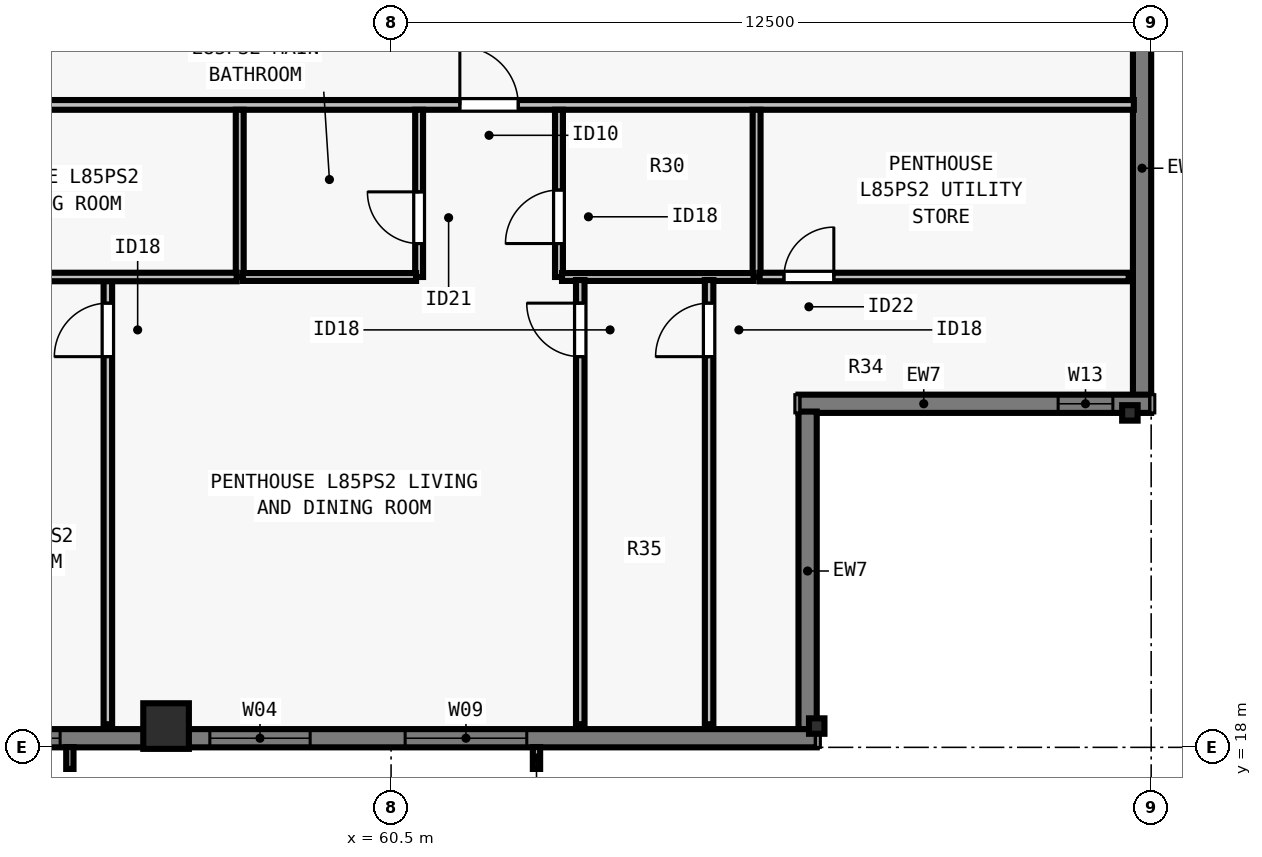
"""IFC4 building model, lengths in metres.
Left out: names, types, materials, properties, quantities, classifications, styles, units other than length and angle.
Written with IfcOpenShell. Run it as: python <this file> out.ifc"""

import sys

from ifc_helpers import new_model, si_unit, direction, frame, frame_2d, origin, origin_2d, place, context, subcontext, project, spatial, rectangle, i_section, extrude, element, fill, save


model = new_model("IFC4")
c1 = context("Model", 3, precision=1e-05, world=origin(), true_north=direction((0.0, 1.0)))
c2 = subcontext(c1, "Body", "Model", "MODEL_VIEW")
j1 = project(units=[si_unit("LENGTHUNIT", "METRE"), si_unit("PLANEANGLEUNIT", "RADIAN")], contexts=[c1])
p1 = place(None, origin())
s1 = spatial("IfcSite", under=j1, at=p1, CompositionType="ELEMENT")
p2 = place(p1, origin())
s2 = spatial("IfcBuilding", under=s1, at=p2, CompositionType="ELEMENT")
p3 = place(p2, frame((0.0, 0.0, 308.5)))
s3 = spatial("IfcBuildingStorey", under=s2, at=p3, CompositionType="ELEMENT", Elevation=308.5)
p4 = place(p3, frame((56.8, 18.35, 0.0), z_axis=(0.0, 0.0, 1.0), x_axis=(1.0, 0.0, 0.0)))
e1 = element("IfcColumn", 1, at=p4, inside=s3, PredefinedType="COLUMN", context=c2, shape_type="SweptSolid", body=[
    extrude(rectangle(XDim=0.75, YDim=0.75, at=origin_2d()), origin(), (0.0, 0.0, 1.0), 3.5),
])
for number, where, z_axis, x_axis in (
    (2, (67.5, 18.35, 0.0), (0.0, 0.0, 1.0), (1.0, 0.0, 0.0)),
    (3, (72.65, 23.5, 0.0), (0.0, 0.0, 1.0), (0.0, 1.0, 0.0)),
):
    element("IfcColumn", number, at=place(p3, frame(where, z_axis=z_axis, x_axis=x_axis)), inside=s3, PredefinedType="COLUMN", context=c2, shape_type="SweptSolid", body=[
        extrude(i_section(OverallWidth=0.254, OverallDepth=0.254, WebThickness=0.009, FlangeThickness=0.014, FilletRadius=0.013, at=origin_2d()), origin(), (0.0, 0.0, 1.0), 3.5),
    ])
p5 = place(p3, frame((72.85, 36.4, 0.0), z_axis=(0.0, 0.0, 1.0), x_axis=(0.0, -1.0, 0.0)))
e4 = element("IfcWall", 4, at=p5, inside=s3, PredefinedType="SOLIDWALL", context=c2, shape_type="SweptSolid", body=[
    extrude(rectangle(XDim=12.622, YDim=0.3, at=frame_2d((6.311, 0.0))), origin(), (0.0, 0.0, 1.0), 3.29),
])
p6 = place(p5, frame((2.98, 0.0, 0.8)))
e5 = element("IfcOpeningElement", 5, at=p6, cuts=e4, PredefinedType="OPENING", context=c2, shape_type="SweptSolid", body=[
    extrude(rectangle(XDim=2.0, YDim=1.758, at=frame_2d((1.0, 0.879))), frame((0.0, 0.16, 0.0), z_axis=(0.0, -1.0, 0.0), x_axis=(1.0, 0.0, 0.0)), (0.0, 0.0, 1.0), 0.32),
])
p7 = place(p3, frame((73.0, 23.65, 0.0), z_axis=(0.0, 0.0, 1.0), x_axis=(-1.0, 0.0, 0.0)))
e6 = element("IfcWall", 6, at=p7, inside=s3, PredefinedType="SOLIDWALL", context=c2, shape_type="SweptSolid", body=[
    extrude(rectangle(XDim=5.8, YDim=0.3, at=frame_2d((2.9, 0.0))), origin(), (0.0, 0.0, 1.0), 3.29),
])
p8 = place(p7, frame((0.63, 0.0, 0.8)))
e7 = element("IfcOpeningElement", 7, at=p8, cuts=e6, PredefinedType="OPENING", context=c2, shape_type="SweptSolid", body=[
    extrude(rectangle(XDim=0.9, YDim=1.75, at=frame_2d((0.45, 0.875))), frame((0.0, 0.16, 0.0), z_axis=(0.0, -1.0, 0.0), x_axis=(1.0, 0.0, 0.0)), (0.0, 0.0, 1.0), 0.32),
])
p9 = place(p3, frame((67.35, 23.522, 0.0), z_axis=(0.0, 0.0, 1.0), x_axis=(0.0, -1.0, 0.0)))
e8 = element("IfcWall", 8, at=p9, inside=s3, PredefinedType="SOLIDWALL", context=c2, shape_type="SweptSolid", body=[
    extrude(rectangle(XDim=5.244, YDim=0.3, at=frame_2d((2.622, 0.0))), origin(), (0.0, 0.0, 1.0), 3.29),
])
p10 = place(p3, frame((67.5, 18.15, 0.0), z_axis=(0.0, 0.0, 1.0), x_axis=(-1.0, 0.0, 0.0)))
e9 = element("IfcWall", 9, at=p10, inside=s3, PredefinedType="SOLIDWALL", context=c2, shape_type="SweptSolid", body=[
    extrude(rectangle(XDim=30.722, YDim=0.3, at=frame_2d((15.361, 0.0))), origin(), (0.0, 0.0, 1.0), 3.29),
])
p11 = place(p10, frame((4.769, 0.0, 0.8)))
e10 = element("IfcOpeningElement", 10, at=p11, cuts=e9, PredefinedType="OPENING", context=c2, shape_type="SweptSolid", body=[
    extrude(rectangle(XDim=2.0, YDim=1.758, at=frame_2d((1.0, 0.879))), frame((0.0, 0.16, 0.0), z_axis=(0.0, -1.0, 0.0), x_axis=(1.0, 0.0, 0.0)), (0.0, 0.0, 1.0), 0.32),
])
p12 = place(p10, frame((8.331, 0.0, 0.8)))
e11 = element("IfcOpeningElement", 11, at=p12, cuts=e9, PredefinedType="OPENING", context=c2, shape_type="SweptSolid", body=[
    extrude(rectangle(XDim=1.65, YDim=1.758, at=frame_2d((0.825, 0.879))), frame((0.0, 0.16, 0.0), z_axis=(0.0, -1.0, 0.0), x_axis=(1.0, 0.0, 0.0)), (0.0, 0.0, 1.0), 0.32),
])
p13 = place(p10, frame((12.442, 0.0, 0.8)))
e12 = element("IfcOpeningElement", 12, at=p13, cuts=e9, PredefinedType="OPENING", context=c2, shape_type="SweptSolid", body=[
    extrude(rectangle(XDim=2.0, YDim=1.758, at=frame_2d((1.0, 0.879))), frame((0.0, 0.16, 0.0), z_axis=(0.0, -1.0, 0.0), x_axis=(1.0, 0.0, 0.0)), (0.0, 0.0, 1.0), 0.32),
])
p14 = place(p10, frame((16.455, 0.0, 0.8)))
e13 = element("IfcOpeningElement", 13, at=p14, cuts=e9, PredefinedType="OPENING", context=c2, shape_type="SweptSolid", body=[
    extrude(rectangle(XDim=1.65, YDim=1.758, at=frame_2d((0.825, 0.879))), frame((0.0, 0.16, 0.0), z_axis=(0.0, -1.0, 0.0), x_axis=(1.0, 0.0, 0.0)), (0.0, 0.0, 1.0), 0.32),
])
p15 = place(p10, frame((20.967, 0.0, 0.8)))
e14 = element("IfcOpeningElement", 14, at=p15, cuts=e9, PredefinedType="OPENING", context=c2, shape_type="SweptSolid", body=[
    extrude(rectangle(XDim=2.0, YDim=1.758, at=frame_2d((1.0, 0.879))), frame((0.0, 0.16, 0.0), z_axis=(0.0, -1.0, 0.0), x_axis=(1.0, 0.0, 0.0)), (0.0, 0.0, 1.0), 0.32),
])
p16 = place(p10, frame((24.128, 0.0, 0.8)))
e15 = element("IfcOpeningElement", 15, at=p16, cuts=e9, PredefinedType="OPENING", context=c2, shape_type="SweptSolid", body=[
    extrude(rectangle(XDim=1.65, YDim=1.758, at=frame_2d((0.825, 0.879))), frame((0.0, 0.16, 0.0), z_axis=(0.0, -1.0, 0.0), x_axis=(1.0, 0.0, 0.0)), (0.0, 0.0, 1.0), 0.32),
])
p17 = place(p3, frame((31.285, 28.565, 0.0), z_axis=(0.0, 0.0, 1.0), x_axis=(1.0, 0.0, 0.0)))
e16 = element("IfcWall", 16, at=p17, inside=s3, PredefinedType="PARTITIONING", context=c2, shape_type="SweptSolid", body=[
    extrude(rectangle(XDim=41.43, YDim=0.16, at=frame_2d((20.715, 0.0))), origin(), (0.0, 0.0, 1.0), 3.009),
])
p18 = place(p17, frame((9.766, 0.0, 0.0)))
e17 = element("IfcOpeningElement", 17, at=p18, cuts=e16, PredefinedType="OPENING", context=c2, shape_type="SweptSolid", body=[
    extrude(rectangle(XDim=0.96, YDim=2.18, at=frame_2d((0.48, 1.09))), frame((0.0, 0.09, 0.0), z_axis=(0.0, -1.0, 0.0), x_axis=(1.0, 0.0, 0.0)), (0.0, 0.0, 1.0), 0.18),
])
p19 = place(p17, frame((30.346, 0.0, 0.0)))
e18 = element("IfcOpeningElement", 18, at=p19, cuts=e16, PredefinedType="OPENING", context=c2, shape_type="SweptSolid", body=[
    extrude(rectangle(XDim=0.96, YDim=2.18, at=frame_2d((0.48, 1.09))), frame((0.0, 0.09, 0.0), z_axis=(0.0, -1.0, 0.0), x_axis=(1.0, 0.0, 0.0)), (0.0, 0.0, 1.0), 0.18),
])
p20 = place(p3, frame((58.011, 25.735, 0.0), z_axis=(0.0, 0.0, 1.0), x_axis=(0.0, 1.0, 0.0)))
e19 = element("IfcWall", 19, at=p20, inside=s3, PredefinedType="PLUMBINGWALL", context=c2, shape_type="SweptSolid", body=[
    extrude(rectangle(XDim=2.75, YDim=0.13, at=frame_2d((1.375, 0.0))), origin(), (0.0, 0.0, 1.0), 3.29),
])
p21 = place(p3, frame((60.961, 25.735, 0.0), z_axis=(0.0, 0.0, 1.0), x_axis=(0.0, 1.0, 0.0)))
e20 = element("IfcWall", 20, at=p21, inside=s3, PredefinedType="PLUMBINGWALL", context=c2, shape_type="SweptSolid", body=[
    extrude(rectangle(XDim=2.75, YDim=0.13, at=frame_2d((1.375, 0.0))), origin(), (0.0, 0.0, 1.0), 3.29),
])
p22 = place(p21, frame((0.55, 0.0, 0.0)))
e21 = element("IfcOpeningElement", 21, at=p22, cuts=e20, PredefinedType="OPENING", context=c2, shape_type="SweptSolid", body=[
    extrude(rectangle(XDim=0.85, YDim=2.08, at=frame_2d((0.425, 1.04))), frame((0.0, 0.075, 0.0), z_axis=(0.0, -1.0, 0.0), x_axis=(1.0, 0.0, 0.0)), (0.0, 0.0, 1.0), 0.15),
])
p23 = place(p3, frame((58.061, 25.735, 0.0), z_axis=(0.0, 0.0, 1.0), x_axis=(1.0, 0.0, 0.0)))
e22 = element("IfcWall", 22, at=p23, inside=s3, PredefinedType="PLUMBINGWALL", context=c2, shape_type="SweptSolid", body=[
    extrude(rectangle(XDim=2.85, YDim=0.13, at=frame_2d((1.425, 0.0))), origin(), (0.0, 0.0, 1.0), 3.29),
])
p24 = place(p3, frame((66.511, 25.735, 0.0), z_axis=(0.0, 0.0, 1.0), x_axis=(0.0, 1.0, 0.0)))
e23 = element("IfcWall", 23, at=p24, inside=s3, PredefinedType="PLUMBINGWALL", context=c2, shape_type="SweptSolid", body=[
    extrude(rectangle(XDim=2.75, YDim=0.13, at=frame_2d((1.375, 0.0))), origin(), (0.0, 0.0, 1.0), 3.29),
])
p25 = place(p3, frame((63.261, 25.735, 0.0), z_axis=(0.0, 0.0, 1.0), x_axis=(0.0, 1.0, 0.0)))
e24 = element("IfcWall", 24, at=p25, inside=s3, PredefinedType="PLUMBINGWALL", context=c2, shape_type="SweptSolid", body=[
    extrude(rectangle(XDim=2.75, YDim=0.13, at=frame_2d((1.375, 0.0))), origin(), (0.0, 0.0, 1.0), 3.29),
])
p26 = place(p25, frame((0.55, 0.0, 0.0)))
e25 = element("IfcOpeningElement", 25, at=p26, cuts=e24, PredefinedType="OPENING", context=c2, shape_type="SweptSolid", body=[
    extrude(rectangle(XDim=0.88, YDim=2.1, at=frame_2d((0.44, 1.05))), frame((0.0, 0.075, 0.0), z_axis=(0.0, -1.0, 0.0), x_axis=(1.0, 0.0, 0.0)), (0.0, 0.0, 1.0), 0.15),
])
p27 = place(p3, frame((63.311, 25.735, 0.0), z_axis=(0.0, 0.0, 1.0), x_axis=(1.0, 0.0, 0.0)))
e26 = element("IfcWall", 26, at=p27, inside=s3, PredefinedType="PLUMBINGWALL", context=c2, shape_type="SweptSolid", body=[
    extrude(rectangle(XDim=3.15, YDim=0.13, at=frame_2d((1.575, 0.0))), origin(), (0.0, 0.0, 1.0), 3.29),
])
p28 = place(p3, frame((55.843, 18.38, 0.0), z_axis=(0.0, 0.0, 1.0), x_axis=(0.0, 1.0, 0.0)))
e27 = element("IfcWall", 27, at=p28, inside=s3, PredefinedType="PARTITIONING", context=c2, shape_type="SweptSolid", body=[
    extrude(rectangle(XDim=7.395, YDim=0.14, at=frame_2d((3.698, 0.0))), origin(), (0.0, 0.0, 1.0), 3.29),
])
p29 = place(p28, frame((6.045, 0.0, 0.0)))
e28 = element("IfcOpeningElement", 28, at=p29, cuts=e27, PredefinedType="OPENING", context=c2, shape_type="SweptSolid", body=[
    extrude(rectangle(XDim=0.88, YDim=2.1, at=frame_2d((0.44, 1.05))), frame((0.0, 0.08, 0.0), z_axis=(0.0, -1.0, 0.0), x_axis=(1.0, 0.0, 0.0)), (0.0, 0.0, 1.0), 0.16),
])
p30 = place(p3, frame((51.708, 25.735, 0.0), z_axis=(0.0, 0.0, 1.0), x_axis=(1.0, 0.0, 0.0)))
e29 = element("IfcWall", 29, at=p30, inside=s3, PredefinedType="PARTITIONING", context=c2, shape_type="SweptSolid", body=[
    extrude(rectangle(XDim=6.254, YDim=0.14, at=frame_2d((3.127, 0.0))), origin(), (0.0, 0.0, 1.0), 3.29),
])
p31 = place(p30, frame((0.335, 0.0, 0.0)))
e30 = element("IfcOpeningElement", 30, at=p31, cuts=e29, PredefinedType="OPENING", context=c2, shape_type="SweptSolid", body=[
    extrude(rectangle(XDim=0.82, YDim=2.1, at=frame_2d((0.41, 1.05))), frame((0.0, 0.08, 0.0), z_axis=(0.0, -1.0, 0.0), x_axis=(1.0, 0.0, 0.0)), (0.0, 0.0, 1.0), 0.16),
])
p32 = place(p3, frame((65.73, 18.38, 0.0), z_axis=(0.0, 0.0, 1.0), x_axis=(0.0, 1.0, 0.0)))
e31 = element("IfcWall", 31, at=p32, inside=s3, PredefinedType="PARTITIONING", context=c2, shape_type="SweptSolid", body=[
    extrude(rectangle(XDim=7.305, YDim=0.14, at=frame_2d((3.653, 0.0))), origin(), (0.0, 0.0, 1.0), 2.653),
])
p33 = place(p32, frame((6.045, 0.0, 0.0)))
e32 = element("IfcOpeningElement", 32, at=p33, cuts=e31, PredefinedType="OPENING", context=c2, shape_type="SweptSolid", body=[
    extrude(rectangle(XDim=0.88, YDim=2.1, at=frame_2d((0.44, 1.05))), frame((0.0, 0.08, 0.0), z_axis=(0.0, -1.0, 0.0), x_axis=(1.0, 0.0, 0.0)), (0.0, 0.0, 1.0), 0.16),
])
p34 = place(p3, frame((66.561, 25.735, 0.0), z_axis=(0.0, 0.0, 1.0), x_axis=(1.0, 0.0, 0.0)))
e33 = element("IfcWall", 33, at=p34, inside=s3, PredefinedType="PARTITIONING", context=c2, shape_type="SweptSolid", body=[
    extrude(rectangle(XDim=6.069, YDim=0.14, at=frame_2d((3.034, 0.0))), origin(), (0.0, 0.0, 1.0), 3.009),
])
p35 = place(p34, frame((0.4, 0.0, 0.0)))
e34 = element("IfcOpeningElement", 34, at=p35, cuts=e33, PredefinedType="OPENING", context=c2, shape_type="SweptSolid", body=[
    extrude(rectangle(XDim=0.82, YDim=2.1, at=frame_2d((0.41, 1.05))), frame((0.0, 0.08, 0.0), z_axis=(0.0, -1.0, 0.0), x_axis=(1.0, 0.0, 0.0)), (0.0, 0.0, 1.0), 0.16),
])
p36 = place(p3, frame((63.611, 18.38, 0.0), z_axis=(0.0, 0.0, 1.0), x_axis=(0.0, 1.0, 0.0)))
e35 = element("IfcWall", 35, at=p36, inside=s3, PredefinedType="PARTITIONING", context=c2, shape_type="SweptSolid", body=[
    extrude(rectangle(XDim=7.305, YDim=0.14, at=frame_2d((3.653, 0.0))), origin(), (0.0, 0.0, 1.0), 2.653),
])
p37 = place(p36, frame((6.045, 0.0, 0.0)))
e36 = element("IfcOpeningElement", 36, at=p37, cuts=e35, PredefinedType="OPENING", context=c2, shape_type="SweptSolid", body=[
    extrude(rectangle(XDim=0.88, YDim=2.1, at=frame_2d((0.44, 1.05))), frame((0.0, 0.08, 0.0), z_axis=(0.0, -1.0, 0.0), x_axis=(1.0, 0.0, 0.0)), (0.0, 0.0, 1.0), 0.16),
])
p38 = place(p11, origin())
e37 = element("IfcWindow", 37, at=p38, inside=s3, PartitioningType="SINGLE_PANEL", PredefinedType="WINDOW", context=c2, shape_type="SweptSolid", body=[
    extrude(rectangle(XDim=2.0, YDim=1.758, at=frame_2d((1.0, 0.879))), frame((0.0, -0.05, 0.0), z_axis=(0.0, -1.0, 0.0), x_axis=(1.0, 0.0, 0.0)), (0.0, 0.0, 1.0), 0.06),
])
fill(e10, e37)
p39 = place(p12, origin())
e38 = element("IfcWindow", 38, at=p39, inside=s3, PartitioningType="SINGLE_PANEL", PredefinedType="WINDOW", context=c2, shape_type="SweptSolid", body=[
    extrude(rectangle(XDim=1.65, YDim=1.758, at=frame_2d((0.825, 0.879))), frame((0.0, -0.05, 0.0), z_axis=(0.0, -1.0, 0.0), x_axis=(1.0, 0.0, 0.0)), (0.0, 0.0, 1.0), 0.06),
])
fill(e11, e38)
p40 = place(p13, origin())
e39 = element("IfcWindow", 39, at=p40, inside=s3, PartitioningType="SINGLE_PANEL", PredefinedType="WINDOW", context=c2, shape_type="SweptSolid", body=[
    extrude(rectangle(XDim=2.0, YDim=1.758, at=frame_2d((1.0, 0.879))), frame((0.0, -0.05, 0.0), z_axis=(0.0, -1.0, 0.0), x_axis=(1.0, 0.0, 0.0)), (0.0, 0.0, 1.0), 0.06),
])
fill(e12, e39)
p41 = place(p8, origin())
e40 = element("IfcWindow", 40, at=p41, inside=s3, PartitioningType="SINGLE_PANEL", PredefinedType="WINDOW", context=c2, shape_type="SweptSolid", body=[
    extrude(rectangle(XDim=0.9, YDim=1.75, at=frame_2d((0.45, 0.875))), frame((0.0, -0.04, 0.0), z_axis=(0.0, -1.0, 0.0), x_axis=(1.0, 0.0, 0.0)), (0.0, 0.0, 1.0), 0.06),
])
fill(e7, e40)
p42 = place(p22, origin())
e41 = element("IfcDoor", 41, at=p42, inside=s3, OperationType="SINGLE_SWING_RIGHT", PredefinedType="DOOR", context=c2, shape_type="SweptSolid", body=[
    extrude(rectangle(XDim=0.85, YDim=2.08, at=frame_2d((0.425, 1.04))), frame((0.0, 0.025, 0.0), z_axis=(0.0, -1.0, 0.0), x_axis=(1.0, 0.0, 0.0)), (0.0, 0.0, 1.0), 0.05),
])
fill(e21, e41)
p43 = place(p26, origin())
e42 = element("IfcDoor", 42, at=p43, inside=s3, OperationType="SINGLE_SWING_LEFT", PredefinedType="DOOR", context=c2, shape_type="SweptSolid", body=[
    extrude(rectangle(XDim=0.88, YDim=2.1, at=frame_2d((0.44, 1.05))), frame((0.0, 0.025, 0.0), z_axis=(0.0, -1.0, 0.0), x_axis=(1.0, 0.0, 0.0)), (0.0, 0.0, 1.0), 0.05),
])
fill(e25, e42)
p44 = place(p29, origin())
e43 = element("IfcDoor", 43, at=p44, inside=s3, OperationType="SINGLE_SWING_LEFT", PredefinedType="DOOR", context=c2, shape_type="SweptSolid", body=[
    extrude(rectangle(XDim=0.88, YDim=2.1, at=frame_2d((0.44, 1.05))), frame((0.0, 0.025, 0.0), z_axis=(0.0, -1.0, 0.0), x_axis=(1.0, 0.0, 0.0)), (0.0, 0.0, 1.0), 0.05),
])
fill(e28, e43)
p45 = place(p35, origin())
e44 = element("IfcDoor", 44, at=p45, inside=s3, OperationType="SINGLE_SWING_RIGHT", PredefinedType="DOOR", context=c2, shape_type="SweptSolid", body=[
    extrude(rectangle(XDim=0.82, YDim=2.1, at=frame_2d((0.41, 1.05))), frame((0.0, 0.025, 0.0), z_axis=(0.0, -1.0, 0.0), x_axis=(1.0, 0.0, 0.0)), (0.0, 0.0, 1.0), 0.05),
])
fill(e34, e44)
p46 = place(p33, origin())
e45 = element("IfcDoor", 45, at=p46, inside=s3, OperationType="SINGLE_SWING_LEFT", PredefinedType="DOOR", context=c2, shape_type="SweptSolid", body=[
    extrude(rectangle(XDim=0.88, YDim=2.1, at=frame_2d((0.44, 1.05))), frame((0.0, 0.025, 0.0), z_axis=(0.0, -1.0, 0.0), x_axis=(1.0, 0.0, 0.0)), (0.0, 0.0, 1.0), 0.05),
])
fill(e32, e45)
p47 = place(p37, origin())
e46 = element("IfcDoor", 46, at=p47, inside=s3, OperationType="SINGLE_SWING_RIGHT", PredefinedType="DOOR", context=c2, shape_type="SweptSolid", body=[
    extrude(rectangle(XDim=0.88, YDim=2.1, at=frame_2d((0.44, 1.05))), frame((0.0, 0.025, 0.0), z_axis=(0.0, -1.0, 0.0), x_axis=(1.0, 0.0, 0.0)), (0.0, 0.0, 1.0), 0.05),
])
fill(e36, e46)
p48 = place(p19, origin())
e47 = element("IfcDoor", 47, at=p48, inside=s3, OperationType="SINGLE_SWING_LEFT", PredefinedType="DOOR", context=c2, shape_type="SweptSolid", body=[
    extrude(rectangle(XDim=0.96, YDim=2.18, at=frame_2d((0.48, 1.09))), frame((0.0, 0.025, 0.0), z_axis=(0.0, -1.0, 0.0), x_axis=(1.0, 0.0, 0.0)), (0.0, 0.0, 1.0), 0.05),
])
fill(e18, e47)
save(model, sys.argv[1])
